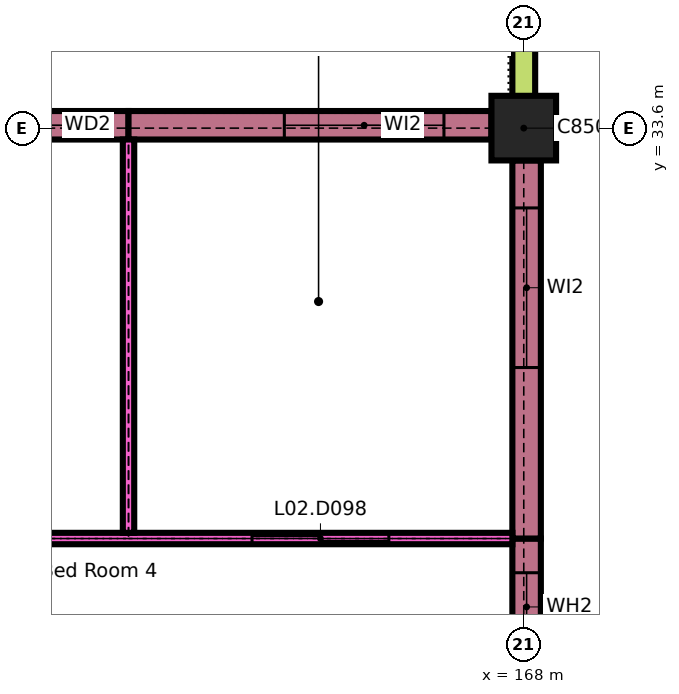
"""IFC4 building model, lengths in metres.
Left out: names, types, materials, properties, quantities, classifications, styles, units other than length and angle.
Written with IfcOpenShell. Run it as: python <this file> out.ifc"""

import sys

from ifc_helpers import new_model, si_unit, direction, frame, frame_2d, origin, origin_2d, place, context, subcontext, project, spatial, rectangle, extrude, element, fill, save


model = new_model("IFC4")
c1 = context("Model", 3, precision=1e-05, world=origin(), true_north=direction((0.0, 1.0)))
c2 = subcontext(c1, "Body", "Model", "MODEL_VIEW")
j1 = project(units=[si_unit("LENGTHUNIT", "METRE"), si_unit("PLANEANGLEUNIT", "RADIAN")], contexts=[c1])
p1 = place(None, origin())
s1 = spatial("IfcSite", under=j1, at=p1, CompositionType="ELEMENT")
p2 = place(p1, origin())
s2 = spatial("IfcBuilding", under=s1, at=p2, CompositionType="ELEMENT")
p3 = place(p2, frame((0.0, 0.0, 8.4)))
s3 = spatial("IfcBuildingStorey", under=s2, at=p3, CompositionType="ELEMENT", Elevation=8.4)
p4 = place(p3, frame((168.0, 33.6, 0.0), z_axis=(0.0, 0.0, 1.0), x_axis=(1.0, 0.0, 0.0)))
e1 = element("IfcColumn", 1, at=p4, inside=s3, PredefinedType="COLUMN", context=c2, shape_type="SweptSolid", body=[
    extrude(rectangle(XDim=0.85, YDim=0.85, at=origin_2d()), origin(), (0.0, 0.0, 1.0), 4.2),
])
p5 = place(p3, frame((160.025, 33.637, 0.0), z_axis=(0.0, 0.0, 1.0), x_axis=(1.0, 0.0, 0.0)))
e2 = element("IfcWall", 2, at=p5, inside=s3, PredefinedType="SOLIDWALL", context=c2, shape_type="SweptSolid", body=[
    extrude(rectangle(XDim=2.775, YDim=0.375, at=frame_2d((1.388, 0.0))), origin(), (0.0, 0.0, 1.0), 3.9),
])
p6 = place(p5, frame((1.075, 0.0, 0.9)))
e3 = element("IfcOpeningElement", 3, at=p6, cuts=e2, PredefinedType="OPENING", context=c2, shape_type="SweptSolid", body=[
    extrude(rectangle(XDim=1.2, YDim=2.1, at=frame_2d((0.6, 1.05))), frame((0.0, 0.198, 0.0), z_axis=(0.0, -1.0, 0.0), x_axis=(1.0, 0.0, 0.0)), (0.0, 0.0, 1.0), 0.395),
])
p7 = place(p3, frame((162.8, 33.637, 0.0), z_axis=(0.0, 0.0, 1.0), x_axis=(1.0, 0.0, 0.0)))
e4 = element("IfcWall", 4, at=p7, inside=s3, PredefinedType="SOLIDWALL", context=c2, shape_type="SweptSolid", body=[
    extrude(rectangle(XDim=4.775, YDim=0.375, at=frame_2d((2.387, 0.0))), origin(), (0.0, 0.0, 1.0), 3.9),
])
p8 = place(p7, frame((2.05, 0.0, 0.9)))
e5 = element("IfcOpeningElement", 5, at=p8, cuts=e4, PredefinedType="OPENING", context=c2, shape_type="SweptSolid", body=[
    extrude(rectangle(XDim=2.1, YDim=2.1, at=frame_2d((1.05, 1.05))), frame((0.0, 0.198, 0.0), z_axis=(0.0, -1.0, 0.0), x_axis=(1.0, 0.0, 0.0)), (0.0, 0.0, 1.0), 0.395),
])
p9 = place(p3, frame((168.038, 25.2, 0.0), z_axis=(0.0, 0.0, 1.0), x_axis=(0.0, 1.0, 0.0)))
e6 = element("IfcWall", 6, at=p9, inside=s3, PredefinedType="SOLIDWALL", context=c2, shape_type="SweptSolid", body=[
    extrude(rectangle(XDim=3.0, YDim=0.375, at=frame_2d((1.5, 0.0))), origin(), (0.0, 0.0, 1.0), 3.9),
])
p10 = place(p9, frame((1.65, 0.0, 0.9)))
e7 = element("IfcOpeningElement", 7, at=p10, cuts=e6, PredefinedType="OPENING", context=c2, shape_type="SweptSolid", body=[
    extrude(rectangle(XDim=0.9, YDim=2.1, at=frame_2d((0.45, 1.05))), frame((0.0, 0.198, 0.0), z_axis=(0.0, -1.0, 0.0), x_axis=(1.0, 0.0, 0.0)), (0.0, 0.0, 1.0), 0.395),
])
p11 = place(p3, frame((168.038, 28.2, 0.0), z_axis=(0.0, 0.0, 1.0), x_axis=(0.0, 1.0, 0.0)))
e8 = element("IfcWall", 8, at=p11, inside=s3, PredefinedType="SOLIDWALL", context=c2, shape_type="SweptSolid", body=[
    extrude(rectangle(XDim=4.975, YDim=0.375, at=frame_2d((2.488, 0.0))), origin(), (0.0, 0.0, 1.0), 3.9),
])
p12 = place(p11, frame((2.25, 0.0, 0.9)))
e9 = element("IfcOpeningElement", 9, at=p12, cuts=e8, PredefinedType="OPENING", context=c2, shape_type="SweptSolid", body=[
    extrude(rectangle(XDim=2.1, YDim=2.1, at=frame_2d((1.05, 1.05))), frame((0.0, 0.198, 0.0), z_axis=(0.0, -1.0, 0.0), x_axis=(1.0, 0.0, 0.0)), (0.0, 0.0, 1.0), 0.395),
])
p13 = place(p3, frame((168.0, 33.75, 0.0), z_axis=(0.0, 0.0, 1.0), x_axis=(0.0, 1.0, 0.0)))
e10 = element("IfcWall", 10, at=p13, inside=s3, PredefinedType="PARAPET", context=c2, shape_type="SweptSolid", body=[
    extrude(rectangle(XDim=41.55, YDim=0.3, at=frame_2d((20.775, 0.0))), origin(), (0.0, 0.0, 1.0), 1.2),
])
p14 = place(p3, frame((117.7, 28.2, 0.0), z_axis=(0.0, 0.0, 1.0), x_axis=(1.0, 0.0, 0.0)))
e11 = element("IfcWall", 11, at=p14, inside=s3, PredefinedType="PARTITIONING", context=c2, shape_type="SweptSolid", body=[
    extrude(rectangle(XDim=50.15, YDim=0.15, at=frame_2d((25.075, 0.0))), origin(), (0.0, 0.0, 1.0), 4.2),
])
p15 = place(p14, frame((1.55, 0.0, 0.0)))
e12 = element("IfcOpeningElement", 12, at=p15, cuts=e11, PredefinedType="OPENING", context=c2, shape_type="SweptSolid", body=[
    extrude(rectangle(XDim=1.8, YDim=2.4, at=frame_2d((0.9, 1.2))), frame((0.0, 0.085, 0.0), z_axis=(0.0, -1.0, 0.0), x_axis=(1.0, 0.0, 0.0)), (0.0, 0.0, 1.0), 0.17),
])
p16 = place(p14, frame((6.5, 0.0, 0.0)))
e13 = element("IfcOpeningElement", 13, at=p16, cuts=e11, PredefinedType="OPENING", context=c2, shape_type="SweptSolid", body=[
    extrude(rectangle(XDim=1.8, YDim=2.4, at=frame_2d((0.9, 1.2))), frame((0.0, 0.085, 0.0), z_axis=(0.0, -1.0, 0.0), x_axis=(1.0, 0.0, 0.0)), (0.0, 0.0, 1.0), 0.17),
])
p17 = place(p14, frame((11.5, 0.0, 0.0)))
e14 = element("IfcOpeningElement", 14, at=p17, cuts=e11, PredefinedType="OPENING", context=c2, shape_type="SweptSolid", body=[
    extrude(rectangle(XDim=1.8, YDim=2.4, at=frame_2d((0.9, 1.2))), frame((0.0, 0.085, 0.0), z_axis=(0.0, -1.0, 0.0), x_axis=(1.0, 0.0, 0.0)), (0.0, 0.0, 1.0), 0.17),
])
p18 = place(p14, frame((16.5, 0.0, 0.0)))
e15 = element("IfcOpeningElement", 15, at=p18, cuts=e11, PredefinedType="OPENING", context=c2, shape_type="SweptSolid", body=[
    extrude(rectangle(XDim=1.8, YDim=2.4, at=frame_2d((0.9, 1.2))), frame((0.0, 0.085, 0.0), z_axis=(0.0, -1.0, 0.0), x_axis=(1.0, 0.0, 0.0)), (0.0, 0.0, 1.0), 0.17),
])
p19 = place(p14, frame((21.95, 0.0, 0.0)))
e16 = element("IfcOpeningElement", 16, at=p19, cuts=e11, PredefinedType="OPENING", context=c2, shape_type="SweptSolid", body=[
    extrude(rectangle(XDim=1.1, YDim=2.1, at=frame_2d((0.55, 1.05))), frame((0.0, 0.085, 0.0), z_axis=(0.0, -1.0, 0.0), x_axis=(1.0, 0.0, 0.0)), (0.0, 0.0, 1.0), 0.17),
])
p20 = place(p14, frame((26.7, 0.0, 0.0)))
e17 = element("IfcOpeningElement", 17, at=p20, cuts=e11, PredefinedType="OPENING", context=c2, shape_type="SweptSolid", body=[
    extrude(rectangle(XDim=1.8, YDim=2.4, at=frame_2d((0.9, 1.2))), frame((0.0, 0.085, 0.0), z_axis=(0.0, -1.0, 0.0), x_axis=(1.0, 0.0, 0.0)), (0.0, 0.0, 1.0), 0.17),
])
p21 = place(p14, frame((31.7, 0.0, 0.0)))
e18 = element("IfcOpeningElement", 18, at=p21, cuts=e11, PredefinedType="OPENING", context=c2, shape_type="SweptSolid", body=[
    extrude(rectangle(XDim=1.8, YDim=2.4, at=frame_2d((0.9, 1.2))), frame((0.0, 0.085, 0.0), z_axis=(0.0, -1.0, 0.0), x_axis=(1.0, 0.0, 0.0)), (0.0, 0.0, 1.0), 0.17),
])
p22 = place(p14, frame((36.7, 0.0, 0.0)))
e19 = element("IfcOpeningElement", 19, at=p22, cuts=e11, PredefinedType="OPENING", context=c2, shape_type="SweptSolid", body=[
    extrude(rectangle(XDim=1.8, YDim=2.4, at=frame_2d((0.9, 1.2))), frame((0.0, 0.085, 0.0), z_axis=(0.0, -1.0, 0.0), x_axis=(1.0, 0.0, 0.0)), (0.0, 0.0, 1.0), 0.17),
])
p23 = place(p14, frame((41.7, 0.0, 0.0)))
e20 = element("IfcOpeningElement", 20, at=p23, cuts=e11, PredefinedType="OPENING", context=c2, shape_type="SweptSolid", body=[
    extrude(rectangle(XDim=1.8, YDim=2.4, at=frame_2d((0.9, 1.2))), frame((0.0, 0.085, 0.0), z_axis=(0.0, -1.0, 0.0), x_axis=(1.0, 0.0, 0.0)), (0.0, 0.0, 1.0), 0.17),
])
p24 = place(p14, frame((46.725, 0.0, 0.0)))
e21 = element("IfcOpeningElement", 21, at=p24, cuts=e11, PredefinedType="OPENING", context=c2, shape_type="SweptSolid", body=[
    extrude(rectangle(XDim=1.8, YDim=2.4, at=frame_2d((0.9, 1.2))), frame((0.0, 0.085, 0.0), z_axis=(0.0, -1.0, 0.0), x_axis=(1.0, 0.0, 0.0)), (0.0, 0.0, 1.0), 0.17),
])
p25 = place(p3, frame((162.8, 28.275, 0.0), z_axis=(0.0, 0.0, 1.0), x_axis=(0.0, 1.0, 0.0)))
e22 = element("IfcWall", 22, at=p25, inside=s3, PredefinedType="PARTITIONING", context=c2, shape_type="SweptSolid", body=[
    extrude(rectangle(XDim=5.175, YDim=0.15, at=frame_2d((2.587, 0.0))), origin(), (0.0, 0.0, 1.0), 4.2),
])
p26 = place(p6, origin())
e23 = element("IfcWindow", 23, at=p26, inside=s3, PartitioningType="SINGLE_PANEL", PredefinedType="WINDOW", context=c2, shape_type="SweptSolid", body=[
    extrude(rectangle(XDim=1.2, YDim=2.1, at=frame_2d((0.6, 1.05))), frame((0.0, 0.03, 0.0), z_axis=(0.0, -1.0, 0.0), x_axis=(1.0, 0.0, 0.0)), (0.0, 0.0, 1.0), 0.06),
])
fill(e3, e23)
p27 = place(p8, origin())
e24 = element("IfcWindow", 24, at=p27, inside=s3, PartitioningType="SINGLE_PANEL", PredefinedType="WINDOW", context=c2, shape_type="SweptSolid", body=[
    extrude(rectangle(XDim=2.1, YDim=2.1, at=frame_2d((1.05, 1.05))), frame((0.0, 0.045, 0.0), z_axis=(0.0, -1.0, 0.0), x_axis=(1.0, 0.0, 0.0)), (0.0, 0.0, 1.0), 0.09),
])
fill(e5, e24)
p28 = place(p10, origin())
e25 = element("IfcWindow", 25, at=p28, inside=s3, PartitioningType="SINGLE_PANEL", PredefinedType="WINDOW", context=c2, shape_type="SweptSolid", body=[
    extrude(rectangle(XDim=0.9, YDim=2.1, at=frame_2d((0.45, 1.05))), frame((0.0, 0.03, 0.0), z_axis=(0.0, -1.0, 0.0), x_axis=(1.0, 0.0, 0.0)), (0.0, 0.0, 1.0), 0.06),
])
fill(e7, e25)
p29 = place(p12, origin())
e26 = element("IfcWindow", 26, at=p29, inside=s3, PartitioningType="SINGLE_PANEL", PredefinedType="WINDOW", context=c2, shape_type="SweptSolid", body=[
    extrude(rectangle(XDim=2.1, YDim=2.1, at=frame_2d((1.05, 1.05))), frame((0.0, 0.045, 0.0), z_axis=(0.0, -1.0, 0.0), x_axis=(1.0, 0.0, 0.0)), (0.0, 0.0, 1.0), 0.09),
])
fill(e9, e26)
p30 = place(p24, origin())
e27 = element("IfcDoor", 27, at=p30, inside=s3, OperationType="DOUBLE_DOOR_SLIDING", PredefinedType="DOOR", context=c2, shape_type="SweptSolid", body=[
    extrude(rectangle(XDim=1.8, YDim=2.4, at=frame_2d((0.9, 1.2))), frame((0.0, 0.035, 0.0), z_axis=(0.0, -1.0, 0.0), x_axis=(1.0, 0.0, 0.0)), (0.0, 0.0, 1.0), 0.07),
])
fill(e21, e27)
save(model, sys.argv[1])
